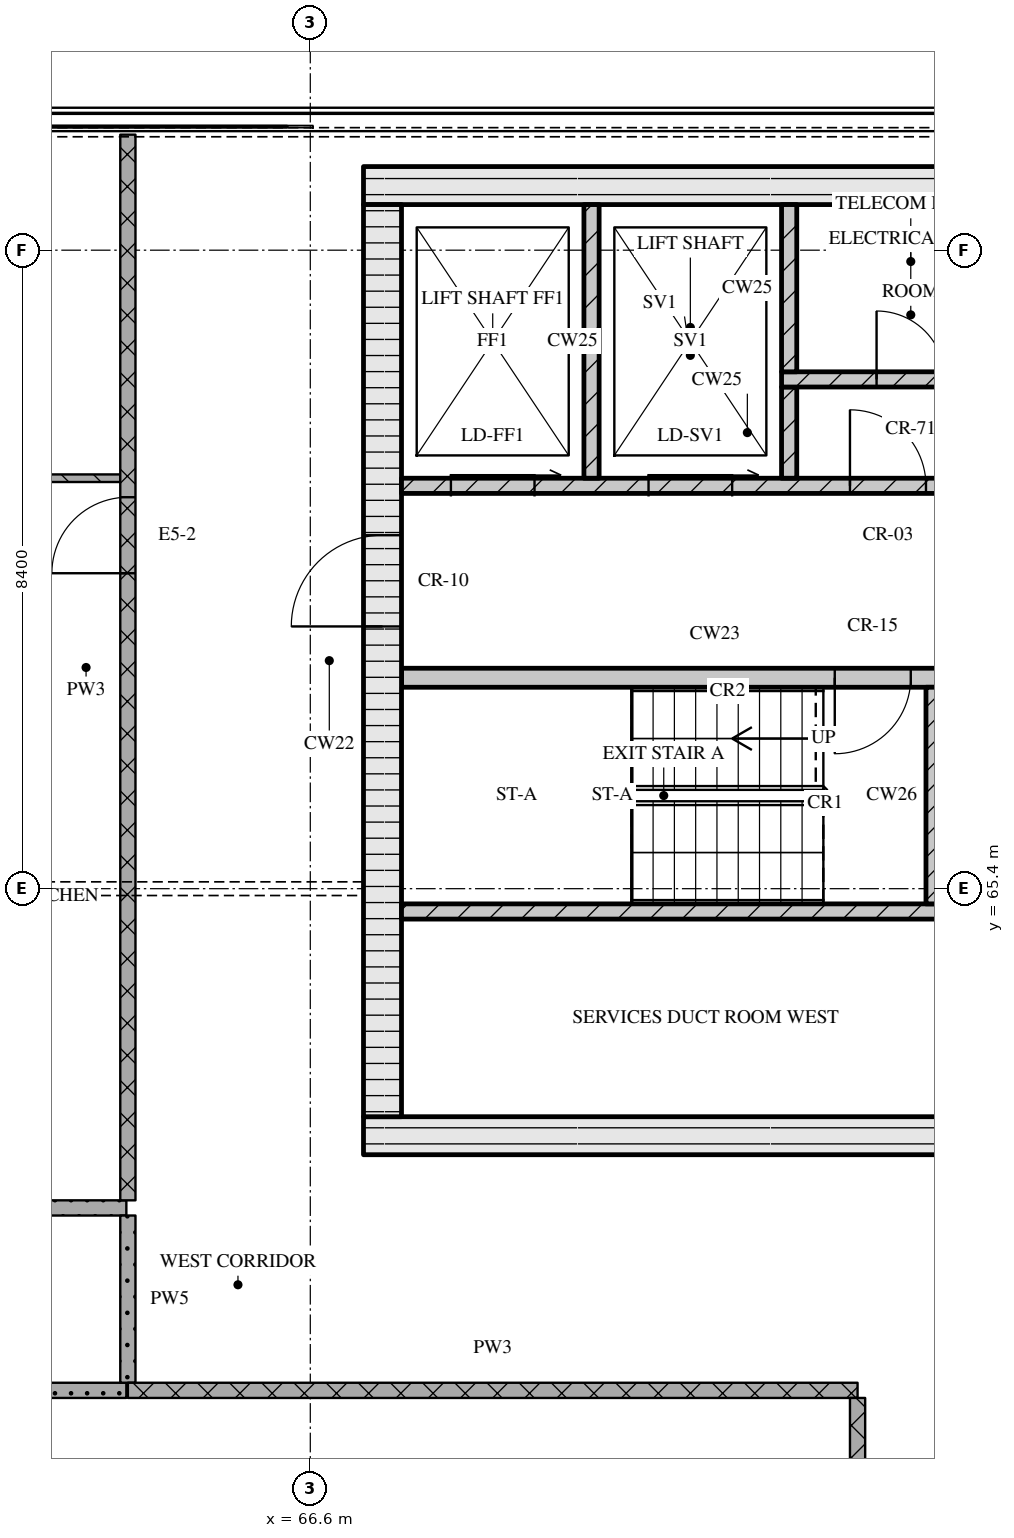
"""IFC4 building model, lengths in metres.
Left out: names, types, materials, properties, quantities, classifications, styles, units other than length and angle.
Written with IfcOpenShell. Run it as: python <this file> out.ifc"""

import sys

from ifc_helpers import new_model, si_unit, direction, frame, frame_2d, origin, place, context, subcontext, project, spatial, rectangle, extrude, element, fill, save


model = new_model("IFC4")
c1 = context("Model", 3, precision=1e-05, world=origin(), true_north=direction((0.0, 1.0)))
c2 = subcontext(c1, "Body", "Model", "MODEL_VIEW")
j1 = project(units=[si_unit("LENGTHUNIT", "METRE"), si_unit("PLANEANGLEUNIT", "RADIAN")], contexts=[c1])
p1 = place(None, origin())
s1 = spatial("IfcSite", under=j1, at=p1, CompositionType="ELEMENT")
p2 = place(p1, origin())
s2 = spatial("IfcBuilding", under=s1, at=p2, CompositionType="ELEMENT")
p3 = place(p2, frame((0.0, 0.0, 295.95)))
s3 = spatial("IfcBuildingStorey", under=s2, at=p3, CompositionType="ELEMENT", Elevation=295.95)
p4 = place(p3, frame((67.3, 62.15, 0.0), z_axis=(0.0, 0.0, 1.0), x_axis=(1.0, 0.0, 0.0)))
e1 = element("IfcWall", 1, at=p4, inside=s3, PredefinedType="SOLIDWALL", context=c2, shape_type="SweptSolid", body=[
    extrude(rectangle(XDim=40.6, YDim=0.5, at=frame_2d((20.3, 0.0))), origin(), (0.0, 0.0, 1.0), 3.32),
])
p5 = place(p4, frame((20.65, 0.0, 0.0)))
e2 = element("IfcOpeningElement", 2, at=p5, cuts=e1, PredefinedType="OPENING", context=c2, shape_type="SweptSolid", body=[
    extrude(rectangle(XDim=1.8, YDim=2.1, at=frame_2d((0.9, 1.05))), frame((0.0, 0.26, 0.0), z_axis=(0.0, -1.0, 0.0), x_axis=(1.0, 0.0, 0.0)), (0.0, 0.0, 1.0), 0.52),
])
p6 = place(p3, frame((67.3, 74.65, 0.0), z_axis=(0.0, 0.0, 1.0), x_axis=(1.0, 0.0, 0.0)))
e3 = element("IfcWall", 3, at=p6, inside=s3, PredefinedType="SOLIDWALL", context=c2, shape_type="SweptSolid", body=[
    extrude(rectangle(XDim=40.6, YDim=0.5, at=frame_2d((20.3, 0.0))), origin(), (0.0, 0.0, 1.0), 3.32),
])
p7 = place(p3, frame((67.55, 62.4, 0.0), z_axis=(0.0, 0.0, 1.0), x_axis=(0.0, 1.0, 0.0)))
e4 = element("IfcWall", 4, at=p7, inside=s3, PredefinedType="SOLIDWALL", context=c2, shape_type="SweptSolid", body=[
    extrude(rectangle(XDim=12.0, YDim=0.5, at=frame_2d((6.0, 0.0))), origin(), (0.0, 0.0, 1.0), 3.32),
])
p8 = place(p7, frame((6.45, 0.0, 0.0)))
e5 = element("IfcOpeningElement", 5, at=p8, cuts=e4, PredefinedType="OPENING", context=c2, shape_type="SweptSolid", body=[
    extrude(rectangle(XDim=1.2, YDim=2.1, at=frame_2d((0.6, 1.05))), frame((0.0, 0.26, 0.0), z_axis=(0.0, -1.0, 0.0), x_axis=(1.0, 0.0, 0.0)), (0.0, 0.0, 1.0), 0.52),
])
p9 = place(p3, frame((67.8, 65.1, 0.0), z_axis=(0.0, 0.0, 1.0), x_axis=(1.0, 0.0, 0.0)))
e6 = element("IfcWall", 6, at=p9, inside=s3, PredefinedType="SOLIDWALL", context=c2, shape_type="SweptSolid", body=[
    extrude(rectangle(XDim=18.5, YDim=0.2, at=frame_2d((9.25, 0.0))), origin(), (0.0, 0.0, 1.0), 3.32),
])
p10 = place(p9, frame((7.27, 0.0, 0.0)))
e7 = element("IfcOpeningElement", 7, at=p10, cuts=e6, PredefinedType="OPENING", context=c2, shape_type="SweptSolid", body=[
    extrude(rectangle(XDim=0.9, YDim=2.1, at=frame_2d((0.45, 1.05))), frame((0.0, 0.11, 0.0), z_axis=(0.0, -1.0, 0.0), x_axis=(1.0, 0.0, 0.0)), (0.0, 0.0, 1.0), 0.22),
])
p11 = place(p9, frame((8.95, 0.0, 0.0)))
e8 = element("IfcOpeningElement", 8, at=p11, cuts=e6, PredefinedType="OPENING", context=c2, shape_type="SweptSolid", body=[
    extrude(rectangle(XDim=0.9, YDim=2.1, at=frame_2d((0.45, 1.05))), frame((0.0, 0.11, 0.0), z_axis=(0.0, -1.0, 0.0), x_axis=(1.0, 0.0, 0.0)), (0.0, 0.0, 1.0), 0.22),
])
p12 = place(p9, frame((11.42, 0.0, 0.0)))
e9 = element("IfcOpeningElement", 9, at=p12, cuts=e6, PredefinedType="OPENING", context=c2, shape_type="SweptSolid", body=[
    extrude(rectangle(XDim=0.9, YDim=2.1, at=frame_2d((0.45, 1.05))), frame((0.0, 0.11, 0.0), z_axis=(0.0, -1.0, 0.0), x_axis=(1.0, 0.0, 0.0)), (0.0, 0.0, 1.0), 0.22),
])
p13 = place(p9, frame((13.92, 0.0, 0.0)))
e10 = element("IfcOpeningElement", 10, at=p13, cuts=e6, PredefinedType="OPENING", context=c2, shape_type="SweptSolid", body=[
    extrude(rectangle(XDim=0.9, YDim=2.1, at=frame_2d((0.45, 1.05))), frame((0.0, 0.11, 0.0), z_axis=(0.0, -1.0, 0.0), x_axis=(1.0, 0.0, 0.0)), (0.0, 0.0, 1.0), 0.22),
])
p14 = place(p9, frame((16.7, 0.0, 0.0)))
e11 = element("IfcOpeningElement", 11, at=p14, cuts=e6, PredefinedType="OPENING", context=c2, shape_type="SweptSolid", body=[
    extrude(rectangle(XDim=0.9, YDim=2.1, at=frame_2d((0.45, 1.05))), frame((0.0, 0.11, 0.0), z_axis=(0.0, -1.0, 0.0), x_axis=(1.0, 0.0, 0.0)), (0.0, 0.0, 1.0), 0.22),
])
p15 = place(p3, frame((74.85, 65.2, 0.0), z_axis=(0.0, 0.0, 1.0), x_axis=(0.0, 1.0, 0.0)))
e12 = element("IfcWall", 12, at=p15, inside=s3, PredefinedType="SOLIDWALL", context=c2, shape_type="SweptSolid", body=[
    extrude(rectangle(XDim=2.85, YDim=0.3, at=frame_2d((1.425, 0.0))), origin(), (0.0, 0.0, 1.0), 3.32),
])
p16 = place(p3, frame((67.8, 68.175, 0.0), z_axis=(0.0, 0.0, 1.0), x_axis=(1.0, 0.0, 0.0)))
e13 = element("IfcWall", 13, at=p16, inside=s3, PredefinedType="SOLIDWALL", context=c2, shape_type="SweptSolid", body=[
    extrude(rectangle(XDim=8.25, YDim=0.25, at=frame_2d((4.125, 0.0))), origin(), (0.0, 0.0, 1.0), 3.32),
])
p17 = place(p16, frame((5.7, 0.0, 0.0)))
e14 = element("IfcOpeningElement", 14, at=p17, cuts=e13, PredefinedType="OPENING", context=c2, shape_type="SweptSolid", body=[
    extrude(rectangle(XDim=1.0, YDim=2.1, at=frame_2d((0.5, 1.05))), frame((0.0, 0.135, 0.0), z_axis=(0.0, -1.0, 0.0), x_axis=(1.0, 0.0, 0.0)), (0.0, 0.0, 1.0), 0.27),
])
p18 = place(p16, frame((7.2, 0.0, 0.0)))
e15 = element("IfcOpeningElement", 15, at=p18, cuts=e13, PredefinedType="OPENING", context=c2, shape_type="SweptSolid", body=[
    extrude(rectangle(XDim=0.8, YDim=2.1, at=frame_2d((0.4, 1.05))), frame((0.0, 0.135, 0.0), z_axis=(0.0, -1.0, 0.0), x_axis=(1.0, 0.0, 0.0)), (0.0, 0.0, 1.0), 0.27),
])
p19 = place(p3, frame((67.8, 70.7, 0.0), z_axis=(0.0, 0.0, 1.0), x_axis=(1.0, 0.0, 0.0)))
e16 = element("IfcWall", 16, at=p19, inside=s3, PredefinedType="SOLIDWALL", context=c2, shape_type="SweptSolid", body=[
    extrude(rectangle(XDim=39.6, YDim=0.2, at=frame_2d((19.8, 0.0))), origin(), (0.0, 0.0, 1.0), 3.32),
])
p20 = place(p19, frame((0.65, 0.0, 0.0)))
e17 = element("IfcOpeningElement", 17, at=p20, cuts=e16, PredefinedType="OPENING", context=c2, shape_type="SweptSolid", body=[
    extrude(rectangle(XDim=1.1, YDim=2.1, at=frame_2d((0.55, 1.05))), frame((0.0, 0.11, 0.0), z_axis=(0.0, -1.0, 0.0), x_axis=(1.0, 0.0, 0.0)), (0.0, 0.0, 1.0), 0.22),
])
p21 = place(p19, frame((3.25, 0.0, 0.0)))
e18 = element("IfcOpeningElement", 18, at=p21, cuts=e16, PredefinedType="OPENING", context=c2, shape_type="SweptSolid", body=[
    extrude(rectangle(XDim=1.1, YDim=2.1, at=frame_2d((0.55, 1.05))), frame((0.0, 0.11, 0.0), z_axis=(0.0, -1.0, 0.0), x_axis=(1.0, 0.0, 0.0)), (0.0, 0.0, 1.0), 0.22),
])
p22 = place(p19, frame((5.9, 0.0, 0.0)))
e19 = element("IfcOpeningElement", 19, at=p22, cuts=e16, PredefinedType="OPENING", context=c2, shape_type="SweptSolid", body=[
    extrude(rectangle(XDim=1.0, YDim=2.1, at=frame_2d((0.5, 1.05))), frame((0.0, 0.11, 0.0), z_axis=(0.0, -1.0, 0.0), x_axis=(1.0, 0.0, 0.0)), (0.0, 0.0, 1.0), 0.22),
])
p23 = place(p19, frame((21.7, 0.0, 0.0)))
e20 = element("IfcOpeningElement", 20, at=p23, cuts=e16, PredefinedType="OPENING", context=c2, shape_type="SweptSolid", body=[
    extrude(rectangle(XDim=1.0, YDim=2.1, at=frame_2d((0.5, 1.05))), frame((0.0, 0.11, 0.0), z_axis=(0.0, -1.0, 0.0), x_axis=(1.0, 0.0, 0.0)), (0.0, 0.0, 1.0), 0.22),
])
p24 = place(p19, frame((32.7, 0.0, 0.0)))
e21 = element("IfcOpeningElement", 21, at=p24, cuts=e16, PredefinedType="OPENING", context=c2, shape_type="SweptSolid", body=[
    extrude(rectangle(XDim=1.0, YDim=2.1, at=frame_2d((0.5, 1.05))), frame((0.0, 0.11, 0.0), z_axis=(0.0, -1.0, 0.0), x_axis=(1.0, 0.0, 0.0)), (0.0, 0.0, 1.0), 0.22),
])
p25 = place(p19, frame((35.25, 0.0, 0.0)))
e22 = element("IfcOpeningElement", 22, at=p25, cuts=e16, PredefinedType="OPENING", context=c2, shape_type="SweptSolid", body=[
    extrude(rectangle(XDim=1.1, YDim=2.1, at=frame_2d((0.55, 1.05))), frame((0.0, 0.11, 0.0), z_axis=(0.0, -1.0, 0.0), x_axis=(1.0, 0.0, 0.0)), (0.0, 0.0, 1.0), 0.22),
])
p26 = place(p19, frame((37.85, 0.0, 0.0)))
e23 = element("IfcOpeningElement", 23, at=p26, cuts=e16, PredefinedType="OPENING", context=c2, shape_type="SweptSolid", body=[
    extrude(rectangle(XDim=1.1, YDim=2.1, at=frame_2d((0.55, 1.05))), frame((0.0, 0.11, 0.0), z_axis=(0.0, -1.0, 0.0), x_axis=(1.0, 0.0, 0.0)), (0.0, 0.0, 1.0), 0.22),
])
p27 = place(p3, frame((70.3, 70.8, 0.0), z_axis=(0.0, 0.0, 1.0), x_axis=(0.0, 1.0, 0.0)))
e24 = element("IfcWall", 24, at=p27, inside=s3, PredefinedType="SOLIDWALL", context=c2, shape_type="SweptSolid", body=[
    extrude(rectangle(XDim=3.6, YDim=0.2, at=frame_2d((1.8, 0.0))), origin(), (0.0, 0.0, 1.0), 3.32),
])
p28 = place(p3, frame((72.9, 70.8, 0.0), z_axis=(0.0, 0.0, 1.0), x_axis=(0.0, 1.0, 0.0)))
e25 = element("IfcWall", 25, at=p28, inside=s3, PredefinedType="SOLIDWALL", context=c2, shape_type="SweptSolid", body=[
    extrude(rectangle(XDim=1.2, YDim=0.2, at=frame_2d((0.6, 0.0))), origin(), (0.0, 0.0, 1.0), 3.32),
])
p29 = place(p3, frame((72.8, 72.1, 0.0), z_axis=(0.0, 0.0, 1.0), x_axis=(1.0, 0.0, 0.0)))
e26 = element("IfcWall", 26, at=p29, inside=s3, PredefinedType="SOLIDWALL", context=c2, shape_type="SweptSolid", body=[
    extrude(rectangle(XDim=11.0, YDim=0.2, at=frame_2d((5.5, 0.0))), origin(), (0.0, 0.0, 1.0), 3.32),
])
p30 = place(p29, frame((1.25, 0.0, 0.0)))
e27 = element("IfcOpeningElement", 27, at=p30, cuts=e26, PredefinedType="OPENING", context=c2, shape_type="SweptSolid", body=[
    extrude(rectangle(XDim=0.9, YDim=2.1, at=frame_2d((0.45, 1.05))), frame((0.0, 0.11, 0.0), z_axis=(0.0, -1.0, 0.0), x_axis=(1.0, 0.0, 0.0)), (0.0, 0.0, 1.0), 0.22),
])
p31 = place(p29, frame((3.85, 0.0, 0.0)))
e28 = element("IfcOpeningElement", 28, at=p31, cuts=e26, PredefinedType="OPENING", context=c2, shape_type="SweptSolid", body=[
    extrude(rectangle(XDim=0.9, YDim=2.1, at=frame_2d((0.45, 1.05))), frame((0.0, 0.11, 0.0), z_axis=(0.0, -1.0, 0.0), x_axis=(1.0, 0.0, 0.0)), (0.0, 0.0, 1.0), 0.22),
])
p32 = place(p29, frame((6.42, 0.0, 0.0)))
e29 = element("IfcOpeningElement", 29, at=p32, cuts=e26, PredefinedType="OPENING", context=c2, shape_type="SweptSolid", body=[
    extrude(rectangle(XDim=0.9, YDim=2.1, at=frame_2d((0.45, 1.05))), frame((0.0, 0.11, 0.0), z_axis=(0.0, -1.0, 0.0), x_axis=(1.0, 0.0, 0.0)), (0.0, 0.0, 1.0), 0.22),
])
p33 = place(p29, frame((9.195, 0.0, 0.0)))
e30 = element("IfcOpeningElement", 30, at=p33, cuts=e26, PredefinedType="OPENING", context=c2, shape_type="SweptSolid", body=[
    extrude(rectangle(XDim=0.9, YDim=2.1, at=frame_2d((0.45, 1.05))), frame((0.0, 0.11, 0.0), z_axis=(0.0, -1.0, 0.0), x_axis=(1.0, 0.0, 0.0)), (0.0, 0.0, 1.0), 0.22),
])
p34 = place(p3, frame((72.9, 72.2, 0.0), z_axis=(0.0, 0.0, 1.0), x_axis=(0.0, 1.0, 0.0)))
e31 = element("IfcWall", 31, at=p34, inside=s3, PredefinedType="SOLIDWALL", context=c2, shape_type="SweptSolid", body=[
    extrude(rectangle(XDim=2.2, YDim=0.2, at=frame_2d((1.1, 0.0))), origin(), (0.0, 0.0, 1.0), 3.32),
])
p35 = place(p3, frame((64.2, 58.8, 0.0), z_axis=(0.0, 0.0, 1.0), x_axis=(1.0, 0.0, 0.0)))
e32 = element("IfcWall", 32, at=p35, inside=s3, PredefinedType="PARTITIONING", context=c2, shape_type="SweptSolid", body=[
    extrude(rectangle(XDim=9.6, YDim=0.2, at=frame_2d((4.8, 0.0))), origin(), (0.0, 0.0, 1.0), 3.32),
])
p36 = place(p3, frame((56.7, 58.8, 0.0), z_axis=(0.0, 0.0, 1.0), x_axis=(1.0, 0.0, 0.0)))
e33 = element("IfcWall", 33, at=p36, inside=s3, PredefinedType="PARTITIONING", context=c2, shape_type="SweptSolid", body=[
    extrude(rectangle(XDim=7.48, YDim=0.2, at=frame_2d((3.74, 0.0))), origin(), (0.0, 0.0, 1.0), 3.32),
])
p37 = place(p3, frame((61.52, 61.2, 0.0), z_axis=(0.0, 0.0, 1.0), x_axis=(1.0, 0.0, 0.0)))
e34 = element("IfcWall", 34, at=p37, inside=s3, PredefinedType="PARTITIONING", context=c2, shape_type="SweptSolid", body=[
    extrude(rectangle(XDim=2.66, YDim=0.2, at=frame_2d((1.33, 0.0))), origin(), (0.0, 0.0, 1.0), 3.32),
])
p38 = place(p3, frame((61.5, 70.8, 0.0), z_axis=(0.0, 0.0, 1.0), x_axis=(1.0, 0.0, 0.0)))
e35 = element("IfcWall", 35, at=p38, inside=s3, PredefinedType="PARTITIONING", context=c2, shape_type="SweptSolid", body=[
    extrude(rectangle(XDim=2.6, YDim=0.1, at=frame_2d((1.3, 0.0))), origin(), (0.0, 0.0, 1.0), 3.32),
])
p39 = place(p3, frame((64.2, 61.3, 0.0), z_axis=(0.0, 0.0, 1.0), x_axis=(0.0, 1.0, 0.0)))
e36 = element("IfcWall", 36, at=p39, inside=s3, PredefinedType="PARTITIONING", context=c2, shape_type="SweptSolid", body=[
    extrude(rectangle(XDim=14.02, YDim=0.2, at=frame_2d((7.01, 0.0))), origin(), (0.0, 0.0, 1.0), 3.32),
])
p40 = place(p39, frame((8.25, 0.0, 0.0)))
e37 = element("IfcOpeningElement", 37, at=p40, cuts=e36, PredefinedType="OPENING", context=c2, shape_type="SweptSolid", body=[
    extrude(rectangle(XDim=1.0, YDim=2.1, at=frame_2d((0.5, 1.05))), frame((0.0, 0.11, 0.0), z_axis=(0.0, -1.0, 0.0), x_axis=(1.0, 0.0, 0.0)), (0.0, 0.0, 1.0), 0.22),
])
p41 = place(p3, frame((64.2, 61.1, 0.0), z_axis=(0.0, 0.0, 1.0), x_axis=(0.0, -1.0, 0.0)))
e38 = element("IfcWall", 38, at=p41, inside=s3, PredefinedType="PARTITIONING", context=c2, shape_type="SweptSolid", body=[
    extrude(rectangle(XDim=2.2, YDim=0.2, at=frame_2d((1.1, 0.0))), origin(), (0.0, 0.0, 1.0), 3.32),
])
p42 = place(p3, frame((73.8, 50.7, 0.0), z_axis=(0.0, 0.0, 1.0), x_axis=(0.0, 1.0, 0.0)))
e39 = element("IfcWall", 39, at=p42, inside=s3, PredefinedType="PARTITIONING", context=c2, shape_type="SweptSolid", body=[
    extrude(rectangle(XDim=8.0, YDim=0.2, at=frame_2d((4.0, 0.0))), origin(), (0.0, 0.0, 1.0), 3.32),
])
p43 = place(p42, frame((4.15, 0.0, 0.0)))
e40 = element("IfcOpeningElement", 40, at=p43, cuts=e39, PredefinedType="OPENING", context=c2, shape_type="SweptSolid", body=[
    extrude(rectangle(XDim=1.0, YDim=2.1, at=frame_2d((0.5, 1.05))), frame((0.0, 0.11, 0.0), z_axis=(0.0, -1.0, 0.0), x_axis=(1.0, 0.0, 0.0)), (0.0, 0.0, 1.0), 0.22),
])
p44 = place(p17, origin())
e41 = element("IfcDoor", 41, at=p44, inside=s3, OperationType="SINGLE_SWING_RIGHT", PredefinedType="DOOR", context=c2, shape_type="SweptSolid", body=[
    extrude(rectangle(XDim=1.0, YDim=2.1, at=frame_2d((0.5, 1.05))), frame((0.0, 0.025, 0.0), z_axis=(0.0, -1.0, 0.0), x_axis=(1.0, 0.0, 0.0)), (0.0, 0.0, 1.0), 0.05),
])
fill(e14, e41)
p45 = place(p8, origin())
e42 = element("IfcDoor", 42, at=p45, inside=s3, OperationType="SINGLE_SWING_LEFT", PredefinedType="DOOR", context=c2, shape_type="SweptSolid", body=[
    extrude(rectangle(XDim=1.2, YDim=2.1, at=frame_2d((0.6, 1.05))), frame((0.0, 0.025, 0.0), z_axis=(0.0, -1.0, 0.0), x_axis=(1.0, 0.0, 0.0)), (0.0, 0.0, 1.0), 0.05),
])
fill(e5, e42)
p46 = place(p20, origin())
e43 = element("IfcDoor", 43, at=p46, inside=s3, OperationType="SLIDING_TO_RIGHT", PredefinedType="DOOR", context=c2, shape_type="SweptSolid", body=[
    extrude(rectangle(XDim=1.1, YDim=2.1, at=frame_2d((0.55, 1.05))), frame((0.0, 0.025, 0.0), z_axis=(0.0, -1.0, 0.0), x_axis=(1.0, 0.0, 0.0)), (0.0, 0.0, 1.0), 0.05),
])
fill(e17, e43)
p47 = place(p21, origin())
e44 = element("IfcDoor", 44, at=p47, inside=s3, OperationType="SLIDING_TO_RIGHT", PredefinedType="DOOR", context=c2, shape_type="SweptSolid", body=[
    extrude(rectangle(XDim=1.1, YDim=2.1, at=frame_2d((0.55, 1.05))), frame((0.0, 0.025, 0.0), z_axis=(0.0, -1.0, 0.0), x_axis=(1.0, 0.0, 0.0)), (0.0, 0.0, 1.0), 0.05),
])
fill(e18, e44)
p48 = place(p22, origin())
e45 = element("IfcDoor", 45, at=p48, inside=s3, OperationType="SINGLE_SWING_LEFT", PredefinedType="DOOR", context=c2, shape_type="SweptSolid", body=[
    extrude(rectangle(XDim=1.0, YDim=2.1, at=frame_2d((0.5, 1.05))), frame((0.0, 0.025, 0.0), z_axis=(0.0, -1.0, 0.0), x_axis=(1.0, 0.0, 0.0)), (0.0, 0.0, 1.0), 0.05),
])
fill(e19, e45)
p49 = place(p30, origin())
e46 = element("IfcDoor", 46, at=p49, inside=s3, OperationType="SINGLE_SWING_LEFT", PredefinedType="DOOR", context=c2, shape_type="SweptSolid", body=[
    extrude(rectangle(XDim=0.9, YDim=2.1, at=frame_2d((0.45, 1.05))), frame((0.0, 0.025, 0.0), z_axis=(0.0, -1.0, 0.0), x_axis=(1.0, 0.0, 0.0)), (0.0, 0.0, 1.0), 0.05),
])
fill(e27, e46)
p50 = place(p40, origin())
e47 = element("IfcDoor", 47, at=p50, inside=s3, OperationType="SINGLE_SWING_LEFT", PredefinedType="DOOR", context=c2, shape_type="SweptSolid", body=[
    extrude(rectangle(XDim=1.0, YDim=2.1, at=frame_2d((0.5, 1.05))), frame((0.0, 0.025, 0.0), z_axis=(0.0, -1.0, 0.0), x_axis=(1.0, 0.0, 0.0)), (0.0, 0.0, 1.0), 0.05),
])
fill(e37, e47)
save(model, sys.argv[1])
